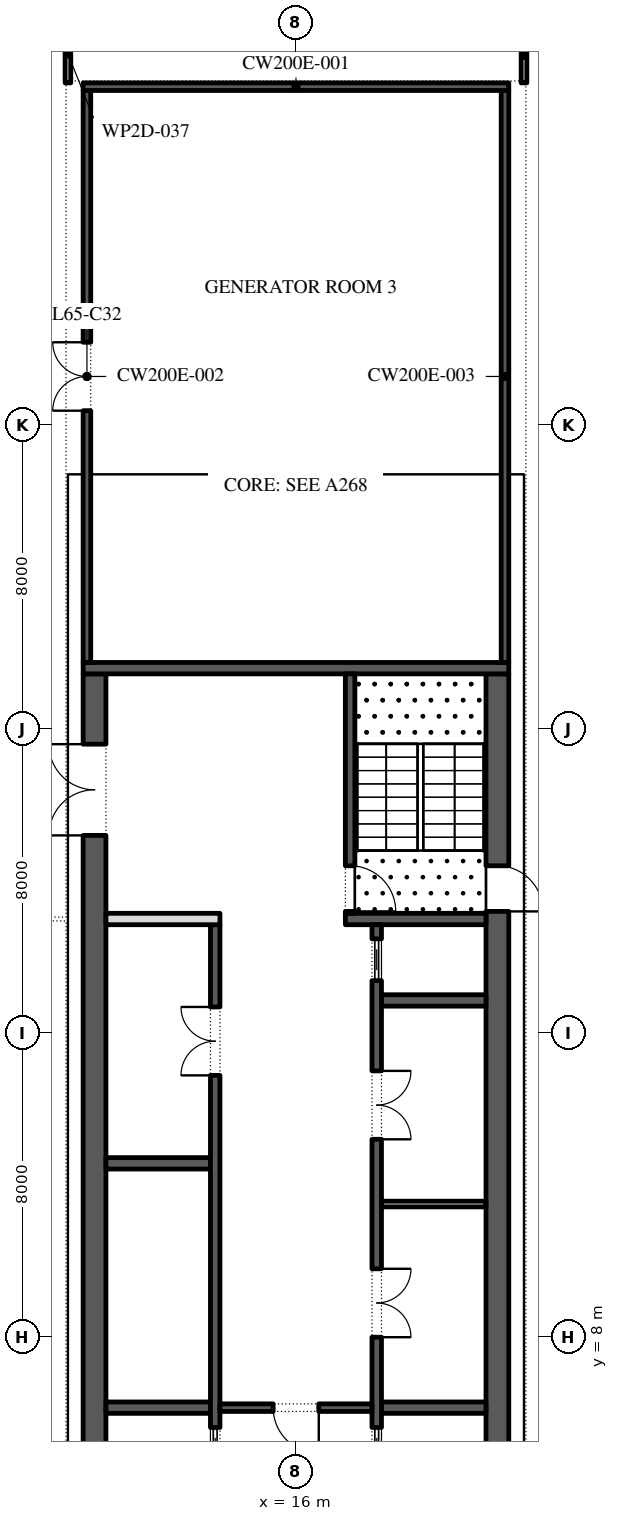
"""IFC4 building model, lengths in metres.
Left out: names, types, materials, properties, quantities, classifications, styles, units other than length and angle.
Written with IfcOpenShell. Run it as: python <this file> out.ifc"""

import sys

from ifc_helpers import new_model, si_unit, direction, frame, frame_2d, origin, place, context, subcontext, project, spatial, rectangle, extrude, element, fill, save


model = new_model("IFC4")
c1 = context("Model", 3, precision=1e-05, world=origin(), true_north=direction((0.0, 1.0)))
c2 = subcontext(c1, "Body", "Model", "MODEL_VIEW")
j1 = project(units=[si_unit("LENGTHUNIT", "METRE"), si_unit("PLANEANGLEUNIT", "RADIAN")], contexts=[c1])
p1 = place(None, origin())
s1 = spatial("IfcSite", under=j1, at=p1, CompositionType="ELEMENT")
p2 = place(p1, origin())
s2 = spatial("IfcBuilding", under=s1, at=p2, CompositionType="ELEMENT")
p3 = place(p2, frame((0.0, 0.0, 297.6)))
s3 = spatial("IfcBuildingStorey", under=s2, at=p3, CompositionType="ELEMENT", Elevation=297.6)
p4 = place(p3, frame((29.616, 40.758, 0.0), z_axis=(0.0, 0.0, 1.0), x_axis=(-0.974370532314, 0.224949029246, 0.0)))
e1 = element("IfcWall", 1, at=p4, inside=s3, PredefinedType="STANDARD", context=c2, shape_type="SweptSolid", body=[
    extrude(rectangle(XDim=48.0, YDim=0.3, at=frame_2d((24.0, 0.0))), origin(), (0.0, 0.0, 1.0), 4.95),
])
p5 = place(p4, frame((2.075, 0.0, 0.6)))
e2 = element("IfcOpeningElement", 2, at=p5, cuts=e1, PredefinedType="OPENING", context=c2, shape_type="SweptSolid", body=[
    extrude(rectangle(XDim=3.6, YDim=3.9, at=frame_2d((1.8, 1.95))), frame((0.0, 0.16, 0.0), z_axis=(0.0, -1.0, 0.0), x_axis=(1.0, 0.0, 0.0)), (0.0, 0.0, 1.0), 0.32),
])
p6 = place(p4, frame((9.975, 0.0, 0.6)))
e3 = element("IfcOpeningElement", 3, at=p6, cuts=e1, PredefinedType="OPENING", context=c2, shape_type="SweptSolid", body=[
    extrude(rectangle(XDim=3.6, YDim=3.55, at=frame_2d((1.8, 1.775))), frame((0.0, 0.16, 0.0), z_axis=(0.0, -1.0, 0.0), x_axis=(1.0, 0.0, 0.0)), (0.0, 0.0, 1.0), 0.32),
])
p7 = place(p4, frame((18.025, 0.0, 0.6)))
e4 = element("IfcOpeningElement", 4, at=p7, cuts=e1, PredefinedType="OPENING", context=c2, shape_type="SweptSolid", body=[
    extrude(rectangle(XDim=3.6, YDim=3.55, at=frame_2d((1.8, 1.775))), frame((0.0, 0.16, 0.0), z_axis=(0.0, -1.0, 0.0), x_axis=(1.0, 0.0, 0.0)), (0.0, 0.0, 1.0), 0.32),
])
p8 = place(p4, frame((26.075, 0.0, 0.6)))
e5 = element("IfcOpeningElement", 5, at=p8, cuts=e1, PredefinedType="OPENING", context=c2, shape_type="SweptSolid", body=[
    extrude(rectangle(XDim=3.6, YDim=3.9, at=frame_2d((1.8, 1.95))), frame((0.0, 0.16, 0.0), z_axis=(0.0, -1.0, 0.0), x_axis=(1.0, 0.0, 0.0)), (0.0, 0.0, 1.0), 0.32),
])
p9 = place(p4, frame((34.125, 0.0, 0.6)))
e6 = element("IfcOpeningElement", 6, at=p9, cuts=e1, PredefinedType="OPENING", context=c2, shape_type="SweptSolid", body=[
    extrude(rectangle(XDim=3.6, YDim=3.55, at=frame_2d((1.8, 1.775))), frame((0.0, 0.16, 0.0), z_axis=(0.0, -1.0, 0.0), x_axis=(1.0, 0.0, 0.0)), (0.0, 0.0, 1.0), 0.32),
])
p10 = place(p4, frame((42.175, 0.0, 0.6)))
e7 = element("IfcOpeningElement", 7, at=p10, cuts=e1, PredefinedType="OPENING", context=c2, shape_type="SweptSolid", body=[
    extrude(rectangle(XDim=3.6, YDim=3.9, at=frame_2d((1.8, 1.95))), frame((0.0, 0.16, 0.0), z_axis=(0.0, -1.0, 0.0), x_axis=(1.0, 0.0, 0.0)), (0.0, 0.0, 1.0), 0.32),
])
p11 = place(p3, frame((21.3, -2.45, 0.0), z_axis=(0.0, 0.0, 1.0), x_axis=(0.0, 1.0, 0.0)))
e8 = element("IfcWall", 8, at=p11, inside=s3, PredefinedType="SHEAR", context=c2, shape_type="SweptSolid", body=[
    extrude(rectangle(XDim=27.9, YDim=0.6, at=frame_2d((13.95, 0.0))), origin(), (0.0, 0.0, 1.0), 4.95),
])
p12 = place(p11, frame((5.05, 0.0, 0.0)))
e9 = element("IfcOpeningElement", 9, at=p12, cuts=e8, PredefinedType="OPENING", context=c2, shape_type="SweptSolid", body=[
    extrude(rectangle(XDim=1.2, YDim=2.1, at=frame_2d((0.6, 1.05))), frame((0.0, 0.31, 0.0), z_axis=(0.0, -1.0, 0.0), x_axis=(1.0, 0.0, 0.0)), (0.0, 0.0, 1.0), 0.62),
])
p13 = place(p11, frame((21.65, 0.0, 0.0)))
e10 = element("IfcOpeningElement", 10, at=p13, cuts=e8, PredefinedType="OPENING", context=c2, shape_type="SweptSolid", body=[
    extrude(rectangle(XDim=1.2, YDim=2.1, at=frame_2d((0.6, 1.05))), frame((0.0, 0.31, 0.0), z_axis=(0.0, -1.0, 0.0), x_axis=(1.0, 0.0, 0.0)), (0.0, 0.0, 1.0), 0.62),
])
p14 = place(p3, frame((10.7, -2.45, 0.0), z_axis=(0.0, 0.0, 1.0), x_axis=(0.0, 1.0, 0.0)))
e11 = element("IfcWall", 11, at=p14, inside=s3, PredefinedType="SHEAR", context=c2, shape_type="SweptSolid", body=[
    extrude(rectangle(XDim=27.9, YDim=0.6, at=frame_2d((13.95, 0.0))), origin(), (0.0, 0.0, 1.0), 4.95),
])
p15 = place(p14, frame((23.65, 0.0, 0.0)))
e12 = element("IfcOpeningElement", 12, at=p15, cuts=e11, PredefinedType="OPENING", context=c2, shape_type="SweptSolid", body=[
    extrude(rectangle(XDim=2.4, YDim=2.1, at=frame_2d((1.2, 1.05))), frame((0.0, 0.31, 0.0), z_axis=(0.0, -1.0, 0.0), x_axis=(1.0, 0.0, 0.0)), (0.0, 0.0, 1.0), 0.62),
])
p16 = place(p14, frame((0.337, 0.0, 0.0)))
e13 = element("IfcOpeningElement", 13, at=p16, cuts=e11, PredefinedType="OPENING", context=c2, shape_type="SweptSolid", body=[
    extrude(rectangle(XDim=1.8, YDim=2.4, at=frame_2d((0.9, 1.2))), frame((0.0, 0.31, 0.0), z_axis=(0.0, -1.0, 0.0), x_axis=(1.0, 0.0, 0.0)), (0.0, 0.0, 1.0), 0.62),
])
p17 = place(p14, frame((3.562, 0.0, 0.0)))
e14 = element("IfcOpeningElement", 14, at=p17, cuts=e11, PredefinedType="OPENING", context=c2, shape_type="SweptSolid", body=[
    extrude(rectangle(XDim=1.8, YDim=2.4, at=frame_2d((0.9, 1.2))), frame((0.0, 0.31, 0.0), z_axis=(0.0, -1.0, 0.0), x_axis=(1.0, 0.0, 0.0)), (0.0, 0.0, 1.0), 0.62),
])
p18 = place(p3, frame((10.4, 25.6, 0.0), z_axis=(0.0, 0.0, 1.0), x_axis=(1.0, 0.0, 0.0)))
e15 = element("IfcWall", 15, at=p18, inside=s3, PredefinedType="SHEAR", context=c2, shape_type="SweptSolid", body=[
    extrude(rectangle(XDim=11.2, YDim=0.3, at=frame_2d((5.6, 0.0))), origin(), (0.0, 0.0, 1.0), 4.95),
])
p19 = place(p3, frame((17.3, 19.0, 0.0), z_axis=(0.0, 0.0, 1.0), x_axis=(1.0, 0.0, 0.0)))
e16 = element("IfcWall", 16, at=p19, inside=s3, PredefinedType="SHEAR", context=c2, shape_type="SweptSolid", body=[
    extrude(rectangle(XDim=3.7, YDim=0.3, at=frame_2d((1.85, 0.0))), origin(), (0.0, 0.0, 1.0), 4.95),
])
p20 = place(p3, frame((17.425, 19.15, 0.0), z_axis=(0.0, 0.0, 1.0), x_axis=(0.0, 1.0, 0.0)))
e17 = element("IfcWall", 17, at=p20, inside=s3, PredefinedType="SHEAR", context=c2, shape_type="SweptSolid", body=[
    extrude(rectangle(XDim=6.3, YDim=0.25, at=frame_2d((3.15, 0.0))), origin(), (0.0, 0.0, 1.0), 4.95),
])
p21 = place(p20, frame((0.05, 0.0, 0.0)))
e18 = element("IfcOpeningElement", 18, at=p21, cuts=e17, PredefinedType="OPENING", context=c2, shape_type="SweptSolid", body=[
    extrude(rectangle(XDim=1.2, YDim=2.1, at=frame_2d((0.6, 1.05))), frame((0.0, 0.135, 0.0), z_axis=(0.0, -1.0, 0.0), x_axis=(1.0, 0.0, 0.0)), (0.0, 0.0, 1.0), 0.27),
])
for number, where, z_axis, x_axis in (
    (19, (18.25, 6.143, 0.0), (0.0, 0.0, 1.0), (1.0, 0.0, 0.0)),
    (20, (18.25, 16.857, 0.0), (0.0, 0.0, 1.0), (1.0, 0.0, 0.0)),
):
    element("IfcWall", number, at=place(p3, frame(where, z_axis=z_axis, x_axis=x_axis)), inside=s3, PredefinedType="SHEAR", context=c2, shape_type="SweptSolid", body=[
        extrude(rectangle(XDim=2.75, YDim=0.3, at=frame_2d((1.375, 0.0))), origin(), (0.0, 0.0, 1.0), 4.95),
    ])
p22 = place(p3, frame((18.125, 4.15, 0.0), z_axis=(0.0, 0.0, 1.0), x_axis=(0.0, 1.0, 0.0)))
e21 = element("IfcWall", 21, at=p22, inside=s3, PredefinedType="SHEAR", context=c2, shape_type="SweptSolid", body=[
    extrude(rectangle(XDim=14.7, YDim=0.25, at=frame_2d((7.35, 0.0))), origin(), (0.0, 0.0, 1.0), 4.95),
])
p23 = place(p22, frame((3.846, 0.0, 0.0)))
e22 = element("IfcOpeningElement", 22, at=p23, cuts=e21, PredefinedType="OPENING", context=c2, shape_type="SweptSolid", body=[
    extrude(rectangle(XDim=1.8, YDim=2.4, at=frame_2d((0.9, 1.2))), frame((0.0, 0.135, 0.0), z_axis=(0.0, -1.0, 0.0), x_axis=(1.0, 0.0, 0.0)), (0.0, 0.0, 1.0), 0.27),
])
p24 = place(p22, frame((9.054, 0.0, 0.0)))
e23 = element("IfcOpeningElement", 23, at=p24, cuts=e21, PredefinedType="OPENING", context=c2, shape_type="SweptSolid", body=[
    extrude(rectangle(XDim=1.8, YDim=2.4, at=frame_2d((0.9, 1.2))), frame((0.0, 0.135, 0.0), z_axis=(0.0, -1.0, 0.0), x_axis=(1.0, 0.0, 0.0)), (0.0, 0.0, 1.0), 0.27),
])
p25 = place(p22, frame((0.371, 0.0, 0.0)))
e24 = element("IfcOpeningElement", 24, at=p25, cuts=e21, PredefinedType="OPENING", context=c2, shape_type="SweptSolid", body=[
    extrude(rectangle(XDim=1.1, YDim=2.1, at=frame_2d((0.55, 1.05))), frame((0.0, 0.135, 0.0), z_axis=(0.0, -1.0, 0.0), x_axis=(1.0, 0.0, 0.0)), (0.0, 0.0, 1.0), 0.27),
])
p26 = place(p22, frame((13.229, 0.0, 0.0)))
e25 = element("IfcOpeningElement", 25, at=p26, cuts=e21, PredefinedType="OPENING", context=c2, shape_type="SweptSolid", body=[
    extrude(rectangle(XDim=1.1, YDim=2.1, at=frame_2d((0.55, 1.05))), frame((0.0, 0.135, 0.0), z_axis=(0.0, -1.0, 0.0), x_axis=(1.0, 0.0, 0.0)), (0.0, 0.0, 1.0), 0.27),
])
p27 = place(p3, frame((18.25, 11.5, 0.0), z_axis=(0.0, 0.0, 1.0), x_axis=(1.0, 0.0, 0.0)))
e26 = element("IfcWall", 26, at=p27, inside=s3, PredefinedType="PARTITIONING", context=c2, shape_type="SweptSolid", body=[
    extrude(rectangle(XDim=2.75, YDim=0.15, at=frame_2d((1.375, 0.0))), origin(), (0.0, 0.0, 1.0), 4.95),
])
for number, where, z_axis, x_axis in (
    (27, (11.0, 6.143, 0.0), (0.0, 0.0, 1.0), (1.0, 0.0, 0.0)),
    (28, (11.0, 12.571, 0.0), (0.0, 0.0, 1.0), (1.0, 0.0, 0.0)),
):
    element("IfcWall", number, at=place(p3, frame(where, z_axis=z_axis, x_axis=x_axis)), inside=s3, PredefinedType="SHEAR", context=c2, shape_type="SweptSolid", body=[
        extrude(rectangle(XDim=2.75, YDim=0.3, at=frame_2d((1.375, 0.0))), origin(), (0.0, 0.0, 1.0), 4.95),
    ])
p28 = place(p3, frame((13.875, -2.45, 0.0), z_axis=(0.0, 0.0, 1.0), x_axis=(0.0, 1.0, 0.0)))
e29 = element("IfcWall", 29, at=p28, inside=s3, PredefinedType="SHEAR", context=c2, shape_type="SweptSolid", body=[
    extrude(rectangle(XDim=21.3, YDim=0.25, at=frame_2d((10.65, 0.0))), origin(), (0.0, 0.0, 1.0), 4.95),
])
p29 = place(p28, frame((17.336, 0.0, 0.0)))
e30 = element("IfcOpeningElement", 30, at=p29, cuts=e29, PredefinedType="OPENING", context=c2, shape_type="SweptSolid", body=[
    extrude(rectangle(XDim=1.8, YDim=2.4, at=frame_2d((0.9, 1.2))), frame((0.0, 0.135, 0.0), z_axis=(0.0, -1.0, 0.0), x_axis=(1.0, 0.0, 0.0)), (0.0, 0.0, 1.0), 0.27),
])
p30 = place(p28, frame((6.971, 0.0, 0.0)))
e31 = element("IfcOpeningElement", 31, at=p30, cuts=e29, PredefinedType="OPENING", context=c2, shape_type="SweptSolid", body=[
    extrude(rectangle(XDim=1.1, YDim=2.1, at=frame_2d((0.55, 1.05))), frame((0.0, 0.135, 0.0), z_axis=(0.0, -1.0, 0.0), x_axis=(1.0, 0.0, 0.0)), (0.0, 0.0, 1.0), 0.27),
])
p31 = place(p3, frame((11.0, 19.0, 0.0), z_axis=(0.0, 0.0, 1.0), x_axis=(1.0, 0.0, 0.0)))
e32 = element("IfcWall", 32, at=p31, inside=s3, PredefinedType="PARTITIONING", context=c2, shape_type="SweptSolid", body=[
    extrude(rectangle(XDim=3.0, YDim=0.3, at=frame_2d((1.5, 0.0))), origin(), (0.0, 0.0, 1.0), 4.95),
])
p32 = place(p3, frame((14.0, 6.143, 0.0), z_axis=(0.0, 0.0, 1.0), x_axis=(1.0, 0.0, 0.0)))
e33 = element("IfcWall", 33, at=p32, inside=s3, PredefinedType="SHEAR", context=c2, shape_type="SweptSolid", body=[
    extrude(rectangle(XDim=4.0, YDim=0.2, at=frame_2d((2.0, 0.0))), origin(), (0.0, 0.0, 1.0), 4.95),
])
p33 = place(p32, frame((1.4, 0.0, 0.0)))
e34 = element("IfcOpeningElement", 34, at=p33, cuts=e33, PredefinedType="OPENING", context=c2, shape_type="SweptSolid", body=[
    extrude(rectangle(XDim=1.2, YDim=2.1, at=frame_2d((0.6, 1.05))), frame((0.0, 0.11, 0.0), z_axis=(0.0, -1.0, 0.0), x_axis=(1.0, 0.0, 0.0)), (0.0, 0.0, 1.0), 0.22),
])
p34 = place(p3, frame((21.5, 25.75, 0.0), z_axis=(0.0, 0.0, 1.0), x_axis=(0.0, 1.0, 0.0)))
e35 = element("IfcWall", 35, at=p34, inside=s3, PredefinedType="SHEAR", context=c2, shape_type="SweptSolid", body=[
    extrude(rectangle(XDim=15.05, YDim=0.2, at=frame_2d((7.525, 0.0))), origin(), (0.0, 0.0, 1.0), 4.95),
])
p35 = place(p3, frame((10.5, 25.75, 0.0), z_axis=(0.0, 0.0, 1.0), x_axis=(0.0, 1.0, 0.0)))
e36 = element("IfcWall", 36, at=p35, inside=s3, PredefinedType="SHEAR", context=c2, shape_type="SweptSolid", body=[
    extrude(rectangle(XDim=15.05, YDim=0.2, at=frame_2d((7.525, 0.0))), origin(), (0.0, 0.0, 1.0), 4.95),
])
p36 = place(p35, frame((6.625, 0.0, 0.0)))
e37 = element("IfcOpeningElement", 37, at=p36, cuts=e36, PredefinedType="OPENING", context=c2, shape_type="SweptSolid", body=[
    extrude(rectangle(XDim=1.8, YDim=2.4, at=frame_2d((0.9, 1.2))), frame((0.0, 0.11, 0.0), z_axis=(0.0, -1.0, 0.0), x_axis=(1.0, 0.0, 0.0)), (0.0, 0.0, 1.0), 0.22),
])
p37 = place(p3, frame((10.4, 40.9, 0.0), z_axis=(0.0, 0.0, 1.0), x_axis=(1.0, 0.0, 0.0)))
e38 = element("IfcWall", 38, at=p37, inside=s3, PredefinedType="SHEAR", context=c2, shape_type="SweptSolid", body=[
    extrude(rectangle(XDim=11.2, YDim=0.2, at=frame_2d((5.6, 0.0))), origin(), (0.0, 0.0, 1.0), 4.95),
])
p38 = place(p3, frame((10.0, 42.525, 0.0), z_axis=(0.0, 0.0, 1.0), x_axis=(0.0, -1.0, 0.0)))
e39 = element("IfcWall", 39, at=p38, inside=s3, PredefinedType="PARTITIONING", context=c2, shape_type="SweptSolid", body=[
    extrude(rectangle(XDim=1.525, YDim=0.15, at=frame_2d((0.762, 0.0))), origin(), (0.0, 0.0, 1.0), 4.95),
])
p39 = place(p3, frame((22.0, 41.0, 0.0), z_axis=(0.0, 0.0, 1.0), x_axis=(0.0, 1.0, 0.0)))
e40 = element("IfcWall", 40, at=p39, inside=s3, PredefinedType="PARTITIONING", context=c2, shape_type="SweptSolid", body=[
    extrude(rectangle(XDim=1.445, YDim=0.15, at=frame_2d((0.723, 0.0))), origin(), (0.0, 0.0, 1.0), 4.95),
])
p40 = place(p23, frame((1.8, -0.2, 0.0), z_axis=(0.0, 0.0, 1.0), x_axis=(-1.0, 0.0, 0.0)))
e41 = element("IfcDoor", 41, at=p40, inside=s3, OperationType="DOUBLE_DOOR_SINGLE_SWING", PredefinedType="DOOR", context=c2, shape_type="SweptSolid", body=[
    extrude(rectangle(XDim=1.8, YDim=2.4, at=frame_2d((0.9, 1.2))), frame((0.0, -0.075, 0.0), z_axis=(0.0, -1.0, 0.0), x_axis=(1.0, 0.0, 0.0)), (0.0, 0.0, 1.0), 0.05),
])
fill(e22, e41)
p41 = place(p24, frame((1.8, -0.2, 0.0), z_axis=(0.0, 0.0, 1.0), x_axis=(-1.0, 0.0, 0.0)))
e42 = element("IfcDoor", 42, at=p41, inside=s3, OperationType="DOUBLE_DOOR_SINGLE_SWING", PredefinedType="DOOR", context=c2, shape_type="SweptSolid", body=[
    extrude(rectangle(XDim=1.8, YDim=2.4, at=frame_2d((0.9, 1.2))), frame((0.0, -0.075, 0.0), z_axis=(0.0, -1.0, 0.0), x_axis=(1.0, 0.0, 0.0)), (0.0, 0.0, 1.0), 0.05),
])
fill(e23, e42)
p42 = place(p25, origin())
e43 = element("IfcDoor", 43, at=p42, inside=s3, OperationType="SLIDING_TO_LEFT", PredefinedType="DOOR", context=c2, shape_type="SweptSolid", body=[
    extrude(rectangle(XDim=1.1, YDim=2.1, at=frame_2d((0.55, 1.05))), frame((0.0, 0.025, 0.0), z_axis=(0.0, -1.0, 0.0), x_axis=(1.0, 0.0, 0.0)), (0.0, 0.0, 1.0), 0.05),
])
fill(e24, e43)
p43 = place(p26, origin())
e44 = element("IfcDoor", 44, at=p43, inside=s3, OperationType="SLIDING_TO_LEFT", PredefinedType="DOOR", context=c2, shape_type="SweptSolid", body=[
    extrude(rectangle(XDim=1.1, YDim=2.1, at=frame_2d((0.55, 1.05))), frame((0.0, 0.025, 0.0), z_axis=(0.0, -1.0, 0.0), x_axis=(1.0, 0.0, 0.0)), (0.0, 0.0, 1.0), 0.05),
])
fill(e25, e44)
p44 = place(p29, origin())
e45 = element("IfcDoor", 45, at=p44, inside=s3, OperationType="DOUBLE_DOOR_SINGLE_SWING", PredefinedType="DOOR", context=c2, shape_type="SweptSolid", body=[
    extrude(rectangle(XDim=1.8, YDim=2.4, at=frame_2d((0.9, 1.2))), frame((0.0, 0.125, 0.0), z_axis=(0.0, -1.0, 0.0), x_axis=(1.0, 0.0, 0.0)), (0.0, 0.0, 1.0), 0.05),
])
fill(e30, e45)
p45 = place(p30, origin())
e46 = element("IfcDoor", 46, at=p45, inside=s3, OperationType="SLIDING_TO_LEFT", PredefinedType="DOOR", context=c2, shape_type="SweptSolid", body=[
    extrude(rectangle(XDim=1.1, YDim=2.1, at=frame_2d((0.55, 1.05))), frame((0.0, 0.025, 0.0), z_axis=(0.0, -1.0, 0.0), x_axis=(1.0, 0.0, 0.0)), (0.0, 0.0, 1.0), 0.05),
])
fill(e31, e46)
p46 = place(p33, frame((1.2, 0.0, 0.0), z_axis=(0.0, 0.0, 1.0), x_axis=(-1.0, 0.0, 0.0)))
e47 = element("IfcDoor", 47, at=p46, inside=s3, OperationType="SINGLE_SWING_RIGHT", PredefinedType="DOOR", context=c2, shape_type="SweptSolid", body=[
    extrude(rectangle(XDim=1.2, YDim=2.1, at=frame_2d((0.6, 1.05))), frame((0.0, 0.025, 0.0), z_axis=(0.0, -1.0, 0.0), x_axis=(1.0, 0.0, 0.0)), (0.0, 0.0, 1.0), 0.05),
])
fill(e34, e47)
p47 = place(p15, origin())
e48 = element("IfcDoor", 48, at=p47, inside=s3, OperationType="DOUBLE_DOOR_SINGLE_SWING", PredefinedType="DOOR", context=c2, shape_type="SweptSolid", body=[
    extrude(rectangle(XDim=2.4, YDim=2.1, at=frame_2d((1.2, 1.05))), frame((0.0, 0.025, 0.0), z_axis=(0.0, -1.0, 0.0), x_axis=(1.0, 0.0, 0.0)), (0.0, 0.0, 1.0), 0.05),
])
fill(e12, e48)
p48 = place(p21, frame((1.2, 0.0, 0.0), z_axis=(0.0, 0.0, 1.0), x_axis=(-1.0, 0.0, 0.0)))
e49 = element("IfcDoor", 49, at=p48, inside=s3, OperationType="SINGLE_SWING_LEFT", PredefinedType="DOOR", context=c2, shape_type="SweptSolid", body=[
    extrude(rectangle(XDim=1.2, YDim=2.1, at=frame_2d((0.6, 1.05))), frame((0.0, 0.025, 0.0), z_axis=(0.0, -1.0, 0.0), x_axis=(1.0, 0.0, 0.0)), (0.0, 0.0, 1.0), 0.05),
])
fill(e18, e49)
p49 = place(p13, frame((1.2, 0.0, 0.0), z_axis=(0.0, 0.0, 1.0), x_axis=(-1.0, 0.0, 0.0)))
e50 = element("IfcDoor", 50, at=p49, inside=s3, OperationType="SINGLE_SWING_LEFT", PredefinedType="DOOR", context=c2, shape_type="SweptSolid", body=[
    extrude(rectangle(XDim=1.2, YDim=2.1, at=frame_2d((0.6, 1.05))), frame((0.0, 0.025, 0.0), z_axis=(0.0, -1.0, 0.0), x_axis=(1.0, 0.0, 0.0)), (0.0, 0.0, 1.0), 0.05),
])
fill(e10, e50)
p50 = place(p36, origin())
e51 = element("IfcDoor", 51, at=p50, inside=s3, OperationType="DOUBLE_DOOR_SINGLE_SWING", PredefinedType="DOOR", context=c2, shape_type="SweptSolid", body=[
    extrude(rectangle(XDim=1.8, YDim=2.4, at=frame_2d((0.9, 1.2))), frame((0.0, -0.05, 0.0), z_axis=(0.0, -1.0, 0.0), x_axis=(1.0, 0.0, 0.0)), (0.0, 0.0, 1.0), 0.05),
])
fill(e37, e51)
save(model, sys.argv[1])
